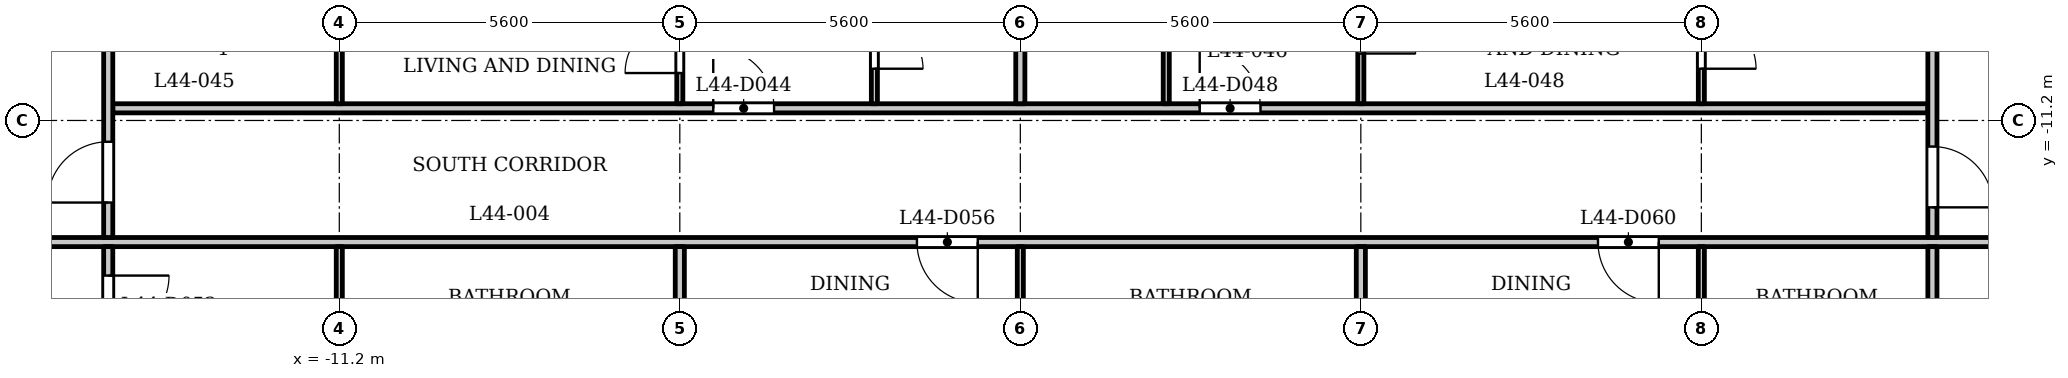
"""IFC4 building model, lengths in metres.
Left out: names, types, materials, properties, quantities, classifications, styles, units other than length and angle.
Written with IfcOpenShell. Run it as: python <this file> out.ifc"""

import sys

from ifc_helpers import new_model, si_unit, direction, frame, frame_2d, origin, place, context, subcontext, project, spatial, rectangle, extrude, element, fill, save


model = new_model("IFC4")
c1 = context("Model", 3, precision=1e-05, world=origin(), true_north=direction((0.0, 1.0)))
c2 = subcontext(c1, "Body", "Model", "MODEL_VIEW")
j1 = project(units=[si_unit("LENGTHUNIT", "METRE"), si_unit("PLANEANGLEUNIT", "RADIAN")], contexts=[c1])
p1 = place(None, origin())
s1 = spatial("IfcSite", under=j1, at=p1, CompositionType="ELEMENT")
p2 = place(p1, origin())
s2 = spatial("IfcBuilding", under=s1, at=p2, CompositionType="ELEMENT")
p3 = place(p2, frame((0.0, 0.0, 171.1)))
s3 = spatial("IfcBuildingStorey", under=s2, at=p3, CompositionType="ELEMENT", Elevation=171.1)
p4 = place(p3, frame((-17.4, -13.2, 0.0), z_axis=(0.0, 0.0, 1.0), x_axis=(1.0, 0.0, 0.0)))
e1 = element("IfcWall", 1, at=p4, inside=s3, PredefinedType="PARTITIONING", context=c2, shape_type="SweptSolid", body=[
    extrude(rectangle(XDim=34.8, YDim=0.15, at=frame_2d((17.4, 0.0))), origin(), (0.0, 0.0, 1.0), 3.2),
])
p5 = place(p4, frame((0.15, 0.0, 0.0)))
e2 = element("IfcOpeningElement", 2, at=p5, cuts=e1, PredefinedType="OPENING", context=c2, shape_type="SweptSolid", body=[
    extrude(rectangle(XDim=1.0, YDim=2.1, at=frame_2d((0.5, 1.05))), frame((0.0, 0.085, 0.0), z_axis=(0.0, -1.0, 0.0), x_axis=(1.0, 0.0, 0.0)), (0.0, 0.0, 1.0), 0.17),
])
p6 = place(p4, frame((33.55, 0.0, 0.0)))
e3 = element("IfcOpeningElement", 3, at=p6, cuts=e1, PredefinedType="OPENING", context=c2, shape_type="SweptSolid", body=[
    extrude(rectangle(XDim=1.0, YDim=2.1, at=frame_2d((0.5, 1.05))), frame((0.0, 0.085, 0.0), z_axis=(0.0, -1.0, 0.0), x_axis=(1.0, 0.0, 0.0)), (0.0, 0.0, 1.0), 0.17),
])
p7 = place(p4, frame((15.7, 0.0, 0.0)))
e4 = element("IfcOpeningElement", 4, at=p7, cuts=e1, PredefinedType="OPENING", context=c2, shape_type="SweptSolid", body=[
    extrude(rectangle(XDim=1.0, YDim=2.1, at=frame_2d((0.5, 1.05))), frame((0.0, 0.085, 0.0), z_axis=(0.0, -1.0, 0.0), x_axis=(1.0, 0.0, 0.0)), (0.0, 0.0, 1.0), 0.17),
])
p8 = place(p4, frame((26.9, 0.0, 0.0)))
e5 = element("IfcOpeningElement", 5, at=p8, cuts=e1, PredefinedType="OPENING", context=c2, shape_type="SweptSolid", body=[
    extrude(rectangle(XDim=1.0, YDim=2.1, at=frame_2d((0.5, 1.05))), frame((0.0, 0.085, 0.0), z_axis=(0.0, -1.0, 0.0), x_axis=(1.0, 0.0, 0.0)), (0.0, 0.0, 1.0), 0.17),
])
p9 = place(p3, frame((-14.925, -11.0, 0.0), z_axis=(0.0, 0.0, 1.0), x_axis=(1.0, 0.0, 0.0)))
e6 = element("IfcWall", 6, at=p9, inside=s3, PredefinedType="PARTITIONING", context=c2, shape_type="SweptSolid", body=[
    extrude(rectangle(XDim=29.85, YDim=0.15, at=frame_2d((14.925, 0.0))), origin(), (0.0, 0.0, 1.0), 3.2),
])
p10 = place(p9, frame((9.875, 0.0, 0.0)))
e7 = element("IfcOpeningElement", 7, at=p10, cuts=e6, PredefinedType="OPENING", context=c2, shape_type="SweptSolid", body=[
    extrude(rectangle(XDim=1.0, YDim=2.1, at=frame_2d((0.5, 1.05))), frame((0.0, 0.085, 0.0), z_axis=(0.0, -1.0, 0.0), x_axis=(1.0, 0.0, 0.0)), (0.0, 0.0, 1.0), 0.17),
])
p11 = place(p9, frame((17.875, 0.0, 0.0)))
e8 = element("IfcOpeningElement", 8, at=p11, cuts=e6, PredefinedType="OPENING", context=c2, shape_type="SweptSolid", body=[
    extrude(rectangle(XDim=1.0, YDim=2.1, at=frame_2d((0.5, 1.05))), frame((0.0, 0.085, 0.0), z_axis=(0.0, -1.0, 0.0), x_axis=(1.0, 0.0, 0.0)), (0.0, 0.0, 1.0), 0.17),
])
p12 = place(p3, frame((-15.0, -15.325, 0.0), z_axis=(0.0, 0.0, 1.0), x_axis=(0.0, 1.0, 0.0)))
e9 = element("IfcWall", 9, at=p12, inside=s3, PredefinedType="PARTITIONING", context=c2, shape_type="SweptSolid", body=[
    extrude(rectangle(XDim=2.05, YDim=0.15, at=frame_2d((1.025, 0.0))), origin(), (0.0, 0.0, 1.0), 3.2),
])
p13 = place(p12, frame((0.574, 0.0, 0.0)))
e10 = element("IfcOpeningElement", 10, at=p13, cuts=e9, PredefinedType="OPENING", context=c2, shape_type="SweptSolid", body=[
    extrude(rectangle(XDim=1.0, YDim=2.1, at=frame_2d((0.5, 1.05))), frame((0.0, 0.085, 0.0), z_axis=(0.0, -1.0, 0.0), x_axis=(1.0, 0.0, 0.0)), (0.0, 0.0, 1.0), 0.17),
])
p14 = place(p3, frame((-15.0, -13.125, 0.0), z_axis=(0.0, 0.0, 1.0), x_axis=(0.0, 1.0, 0.0)))
e11 = element("IfcWall", 11, at=p14, inside=s3, PredefinedType="PARTITIONING", context=c2, shape_type="SweptSolid", body=[
    extrude(rectangle(XDim=6.356, YDim=0.15, at=frame_2d((3.178, 0.0))), origin(), (0.0, 0.0, 1.0), 3.2),
])
p15 = place(p14, frame((0.575, 0.0, 0.0)))
e12 = element("IfcOpeningElement", 12, at=p15, cuts=e11, PredefinedType="OPENING", context=c2, shape_type="SweptSolid", body=[
    extrude(rectangle(XDim=1.0, YDim=2.1, at=frame_2d((0.5, 1.05))), frame((0.0, 0.085, 0.0), z_axis=(0.0, -1.0, 0.0), x_axis=(1.0, 0.0, 0.0)), (0.0, 0.0, 1.0), 0.17),
])
p16 = place(p3, frame((-11.2, -15.85, 0.0), z_axis=(0.0, 0.0, 1.0), x_axis=(0.0, 1.0, 0.0)))
e13 = element("IfcWall", 13, at=p16, inside=s3, PredefinedType="PARTITIONING", context=c2, shape_type="SweptSolid", body=[
    extrude(rectangle(XDim=2.575, YDim=0.1, at=frame_2d((1.288, 0.0))), origin(), (0.0, 0.0, 1.0), 3.2),
])
p17 = place(p3, frame((-11.2, -10.925, 0.0), z_axis=(0.0, 0.0, 1.0), x_axis=(0.0, 1.0, 0.0)))
e14 = element("IfcWall", 14, at=p17, inside=s3, PredefinedType="PARTITIONING", context=c2, shape_type="SweptSolid", body=[
    extrude(rectangle(XDim=3.605, YDim=0.1, at=frame_2d((1.802, 0.0))), origin(), (0.0, 0.0, 1.0), 3.2),
])
p18 = place(p17, frame((1.005, 0.0, 0.0)))
e15 = element("IfcOpeningElement", 15, at=p18, cuts=e14, PredefinedType="OPENING", context=c2, shape_type="SweptSolid", body=[
    extrude(rectangle(XDim=0.9, YDim=2.1, at=frame_2d((0.45, 1.05))), frame((0.0, 0.06, 0.0), z_axis=(0.0, -1.0, 0.0), x_axis=(1.0, 0.0, 0.0)), (0.0, 0.0, 1.0), 0.12),
])
p19 = place(p3, frame((-5.6, -10.925, 0.0), z_axis=(0.0, 0.0, 1.0), x_axis=(0.0, 1.0, 0.0)))
e16 = element("IfcWall", 16, at=p19, inside=s3, PredefinedType="PARTITIONING", context=c2, shape_type="SweptSolid", body=[
    extrude(rectangle(XDim=3.605, YDim=0.1, at=frame_2d((1.802, 0.0))), origin(), (0.0, 0.0, 1.0), 3.2),
])
p20 = place(p19, frame((0.505, 0.0, 0.0)))
e17 = element("IfcOpeningElement", 17, at=p20, cuts=e16, PredefinedType="OPENING", context=c2, shape_type="SweptSolid", body=[
    extrude(rectangle(XDim=0.9, YDim=2.1, at=frame_2d((0.45, 1.05))), frame((0.0, 0.06, 0.0), z_axis=(0.0, -1.0, 0.0), x_axis=(1.0, 0.0, 0.0)), (0.0, 0.0, 1.0), 0.12),
])
p21 = place(p3, frame((-5.6, -15.85, 0.0), z_axis=(0.0, 0.0, 1.0), x_axis=(0.0, 1.0, 0.0)))
e18 = element("IfcWall", 18, at=p21, inside=s3, PredefinedType="PARTITIONING", context=c2, shape_type="SweptSolid", body=[
    extrude(rectangle(XDim=2.575, YDim=0.15, at=frame_2d((1.288, 0.0))), origin(), (0.0, 0.0, 1.0), 3.2),
])
p22 = place(p3, frame((-2.4, -10.925, 0.0), z_axis=(0.0, 0.0, 1.0), x_axis=(0.0, 1.0, 0.0)))
e19 = element("IfcWall", 19, at=p22, inside=s3, PredefinedType="PARTITIONING", context=c2, shape_type="SweptSolid", body=[
    extrude(rectangle(XDim=3.605, YDim=0.1, at=frame_2d((1.802, 0.0))), origin(), (0.0, 0.0, 1.0), 3.2),
])
p23 = place(p22, frame((0.576, 0.0, 0.0)))
e20 = element("IfcOpeningElement", 20, at=p23, cuts=e19, PredefinedType="OPENING", context=c2, shape_type="SweptSolid", body=[
    extrude(rectangle(XDim=0.8, YDim=2.1, at=frame_2d((0.4, 1.05))), frame((0.0, 0.06, 0.0), z_axis=(0.0, -1.0, 0.0), x_axis=(1.0, 0.0, 0.0)), (0.0, 0.0, 1.0), 0.12),
])
p24 = place(p3, frame((0.0, -15.85, 0.0), z_axis=(0.0, 0.0, 1.0), x_axis=(0.0, 1.0, 0.0)))
e21 = element("IfcWall", 21, at=p24, inside=s3, PredefinedType="PARTITIONING", context=c2, shape_type="SweptSolid", body=[
    extrude(rectangle(XDim=2.575, YDim=0.1, at=frame_2d((1.288, 0.0))), origin(), (0.0, 0.0, 1.0), 3.2),
])
p25 = place(p3, frame((0.0, -10.925, 0.0), z_axis=(0.0, 0.0, 1.0), x_axis=(0.0, 1.0, 0.0)))
e22 = element("IfcWall", 22, at=p25, inside=s3, PredefinedType="PARTITIONING", context=c2, shape_type="SweptSolid", body=[
    extrude(rectangle(XDim=3.605, YDim=0.15, at=frame_2d((1.802, 0.0))), origin(), (0.0, 0.0, 1.0), 3.2),
])
p26 = place(p3, frame((2.4, -10.925, 0.0), z_axis=(0.0, 0.0, 1.0), x_axis=(0.0, 1.0, 0.0)))
e23 = element("IfcWall", 23, at=p26, inside=s3, PredefinedType="PARTITIONING", context=c2, shape_type="SweptSolid", body=[
    extrude(rectangle(XDim=3.605, YDim=0.1, at=frame_2d((1.802, 0.0))), origin(), (0.0, 0.0, 1.0), 3.2),
])
p27 = place(p26, frame((2.355, 0.0, 0.0)))
e24 = element("IfcOpeningElement", 24, at=p27, cuts=e23, PredefinedType="OPENING", context=c2, shape_type="SweptSolid", body=[
    extrude(rectangle(XDim=0.8, YDim=2.1, at=frame_2d((0.4, 1.05))), frame((0.0, 0.06, 0.0), z_axis=(0.0, -1.0, 0.0), x_axis=(1.0, 0.0, 0.0)), (0.0, 0.0, 1.0), 0.12),
])
p28 = place(p3, frame((5.6, -10.925, 0.0), z_axis=(0.0, 0.0, 1.0), x_axis=(0.0, 1.0, 0.0)))
e25 = element("IfcWall", 25, at=p28, inside=s3, PredefinedType="PARTITIONING", context=c2, shape_type="SweptSolid", body=[
    extrude(rectangle(XDim=3.605, YDim=0.1, at=frame_2d((1.802, 0.0))), origin(), (0.0, 0.0, 1.0), 3.2),
])
p29 = place(p28, frame((0.826, 0.0, 0.0)))
e26 = element("IfcOpeningElement", 26, at=p29, cuts=e25, PredefinedType="OPENING", context=c2, shape_type="SweptSolid", body=[
    extrude(rectangle(XDim=0.9, YDim=2.1, at=frame_2d((0.45, 1.05))), frame((0.0, 0.06, 0.0), z_axis=(0.0, -1.0, 0.0), x_axis=(1.0, 0.0, 0.0)), (0.0, 0.0, 1.0), 0.12),
])
p30 = place(p3, frame((5.6, -15.85, 0.0), z_axis=(0.0, 0.0, 1.0), x_axis=(0.0, 1.0, 0.0)))
e27 = element("IfcWall", 27, at=p30, inside=s3, PredefinedType="PARTITIONING", context=c2, shape_type="SweptSolid", body=[
    extrude(rectangle(XDim=2.575, YDim=0.15, at=frame_2d((1.288, 0.0))), origin(), (0.0, 0.0, 1.0), 3.2),
])
p31 = place(p3, frame((11.2, -15.85, 0.0), z_axis=(0.0, 0.0, 1.0), x_axis=(0.0, 1.0, 0.0)))
e28 = element("IfcWall", 28, at=p31, inside=s3, PredefinedType="PARTITIONING", context=c2, shape_type="SweptSolid", body=[
    extrude(rectangle(XDim=2.575, YDim=0.1, at=frame_2d((1.288, 0.0))), origin(), (0.0, 0.0, 1.0), 3.2),
])
p32 = place(p3, frame((11.2, -10.925, 0.0), z_axis=(0.0, 0.0, 1.0), x_axis=(0.0, 1.0, 0.0)))
e29 = element("IfcWall", 29, at=p32, inside=s3, PredefinedType="PARTITIONING", context=c2, shape_type="SweptSolid", body=[
    extrude(rectangle(XDim=3.605, YDim=0.1, at=frame_2d((1.802, 0.0))), origin(), (0.0, 0.0, 1.0), 3.2),
])
p33 = place(p32, frame((0.576, 0.0, 0.0)))
e30 = element("IfcOpeningElement", 30, at=p33, cuts=e29, PredefinedType="OPENING", context=c2, shape_type="SweptSolid", body=[
    extrude(rectangle(XDim=0.9, YDim=2.1, at=frame_2d((0.45, 1.05))), frame((0.0, 0.06, 0.0), z_axis=(0.0, -1.0, 0.0), x_axis=(1.0, 0.0, 0.0)), (0.0, 0.0, 1.0), 0.12),
])
p34 = place(p3, frame((15.0, -15.325, 0.0), z_axis=(0.0, 0.0, 1.0), x_axis=(0.0, 1.0, 0.0)))
e31 = element("IfcWall", 31, at=p34, inside=s3, PredefinedType="PARTITIONING", context=c2, shape_type="SweptSolid", body=[
    extrude(rectangle(XDim=2.05, YDim=0.15, at=frame_2d((1.025, 0.0))), origin(), (0.0, 0.0, 1.0), 3.2),
])
p35 = place(p3, frame((15.0, -13.125, 0.0), z_axis=(0.0, 0.0, 1.0), x_axis=(0.0, 1.0, 0.0)))
e32 = element("IfcWall", 32, at=p35, inside=s3, PredefinedType="PARTITIONING", context=c2, shape_type="SweptSolid", body=[
    extrude(rectangle(XDim=6.356, YDim=0.15, at=frame_2d((3.178, 0.0))), origin(), (0.0, 0.0, 1.0), 3.2),
])
p36 = place(p35, frame((0.496, 0.0, 0.0)))
e33 = element("IfcOpeningElement", 33, at=p36, cuts=e32, PredefinedType="OPENING", context=c2, shape_type="SweptSolid", body=[
    extrude(rectangle(XDim=1.0, YDim=2.1, at=frame_2d((0.5, 1.05))), frame((0.0, 0.085, 0.0), z_axis=(0.0, -1.0, 0.0), x_axis=(1.0, 0.0, 0.0)), (0.0, 0.0, 1.0), 0.17),
])
p37 = place(p15, origin())
e34 = element("IfcDoor", 34, at=p37, inside=s3, OperationType="SINGLE_SWING_RIGHT", PredefinedType="DOOR", context=c2, shape_type="SweptSolid", body=[
    extrude(rectangle(XDim=1.0, YDim=2.1, at=frame_2d((0.5, 1.05))), frame((0.0, 0.025, 0.0), z_axis=(0.0, -1.0, 0.0), x_axis=(1.0, 0.0, 0.0)), (0.0, 0.0, 1.0), 0.05),
])
fill(e12, e34)
p38 = place(p36, origin())
e35 = element("IfcDoor", 35, at=p38, inside=s3, OperationType="SINGLE_SWING_LEFT", PredefinedType="DOOR", context=c2, shape_type="SweptSolid", body=[
    extrude(rectangle(XDim=1.0, YDim=2.1, at=frame_2d((0.5, 1.05))), frame((0.0, 0.025, 0.0), z_axis=(0.0, -1.0, 0.0), x_axis=(1.0, 0.0, 0.0)), (0.0, 0.0, 1.0), 0.05),
])
fill(e33, e35)
p39 = place(p10, origin())
e36 = element("IfcDoor", 36, at=p39, inside=s3, OperationType="SINGLE_SWING_RIGHT", PredefinedType="DOOR", context=c2, shape_type="SweptSolid", body=[
    extrude(rectangle(XDim=1.0, YDim=2.1, at=frame_2d((0.5, 1.05))), frame((0.0, 0.025, 0.0), z_axis=(0.0, -1.0, 0.0), x_axis=(1.0, 0.0, 0.0)), (0.0, 0.0, 1.0), 0.05),
])
fill(e7, e36)
p40 = place(p23, origin())
e37 = element("IfcDoor", 37, at=p40, inside=s3, OperationType="SINGLE_SWING_LEFT", PredefinedType="DOOR", context=c2, shape_type="SweptSolid", body=[
    extrude(rectangle(XDim=0.8, YDim=2.1, at=frame_2d((0.4, 1.05))), frame((0.0, 0.025, 0.0), z_axis=(0.0, -1.0, 0.0), x_axis=(1.0, 0.0, 0.0)), (0.0, 0.0, 1.0), 0.05),
])
fill(e20, e37)
p41 = place(p20, origin())
e38 = element("IfcDoor", 38, at=p41, inside=s3, OperationType="SINGLE_SWING_RIGHT", PredefinedType="DOOR", context=c2, shape_type="SweptSolid", body=[
    extrude(rectangle(XDim=0.9, YDim=2.1, at=frame_2d((0.45, 1.05))), frame((0.0, 0.025, 0.0), z_axis=(0.0, -1.0, 0.0), x_axis=(1.0, 0.0, 0.0)), (0.0, 0.0, 1.0), 0.05),
])
fill(e17, e38)
p42 = place(p11, origin())
e39 = element("IfcDoor", 39, at=p42, inside=s3, OperationType="SINGLE_SWING_RIGHT", PredefinedType="DOOR", context=c2, shape_type="SweptSolid", body=[
    extrude(rectangle(XDim=1.0, YDim=2.1, at=frame_2d((0.5, 1.05))), frame((0.0, 0.025, 0.0), z_axis=(0.0, -1.0, 0.0), x_axis=(1.0, 0.0, 0.0)), (0.0, 0.0, 1.0), 0.05),
])
fill(e8, e39)
p43 = place(p29, origin())
e40 = element("IfcDoor", 40, at=p43, inside=s3, OperationType="SINGLE_SWING_LEFT", PredefinedType="DOOR", context=c2, shape_type="SweptSolid", body=[
    extrude(rectangle(XDim=0.9, YDim=2.1, at=frame_2d((0.45, 1.05))), frame((0.0, 0.025, 0.0), z_axis=(0.0, -1.0, 0.0), x_axis=(1.0, 0.0, 0.0)), (0.0, 0.0, 1.0), 0.05),
])
fill(e26, e40)
p44 = place(p33, origin())
e41 = element("IfcDoor", 41, at=p44, inside=s3, OperationType="SINGLE_SWING_LEFT", PredefinedType="DOOR", context=c2, shape_type="SweptSolid", body=[
    extrude(rectangle(XDim=0.9, YDim=2.1, at=frame_2d((0.45, 1.05))), frame((0.0, 0.025, 0.0), z_axis=(0.0, -1.0, 0.0), x_axis=(1.0, 0.0, 0.0)), (0.0, 0.0, 1.0), 0.05),
])
fill(e30, e41)
p45 = place(p13, origin())
e42 = element("IfcDoor", 42, at=p45, inside=s3, OperationType="SINGLE_SWING_RIGHT", PredefinedType="DOOR", context=c2, shape_type="SweptSolid", body=[
    extrude(rectangle(XDim=1.0, YDim=2.1, at=frame_2d((0.5, 1.05))), frame((0.0, 0.025, 0.0), z_axis=(0.0, -1.0, 0.0), x_axis=(1.0, 0.0, 0.0)), (0.0, 0.0, 1.0), 0.05),
])
fill(e10, e42)
p46 = place(p7, origin())
e43 = element("IfcDoor", 43, at=p46, inside=s3, OperationType="SINGLE_SWING_RIGHT", PredefinedType="DOOR", context=c2, shape_type="SweptSolid", body=[
    extrude(rectangle(XDim=1.0, YDim=2.1, at=frame_2d((0.5, 1.05))), frame((0.0, 0.025, 0.0), z_axis=(0.0, -1.0, 0.0), x_axis=(1.0, 0.0, 0.0)), (0.0, 0.0, 1.0), 0.05),
])
fill(e4, e43)
p47 = place(p8, origin())
e44 = element("IfcDoor", 44, at=p47, inside=s3, OperationType="SINGLE_SWING_RIGHT", PredefinedType="DOOR", context=c2, shape_type="SweptSolid", body=[
    extrude(rectangle(XDim=1.0, YDim=2.1, at=frame_2d((0.5, 1.05))), frame((0.0, 0.025, 0.0), z_axis=(0.0, -1.0, 0.0), x_axis=(1.0, 0.0, 0.0)), (0.0, 0.0, 1.0), 0.05),
])
fill(e5, e44)
save(model, sys.argv[1])
